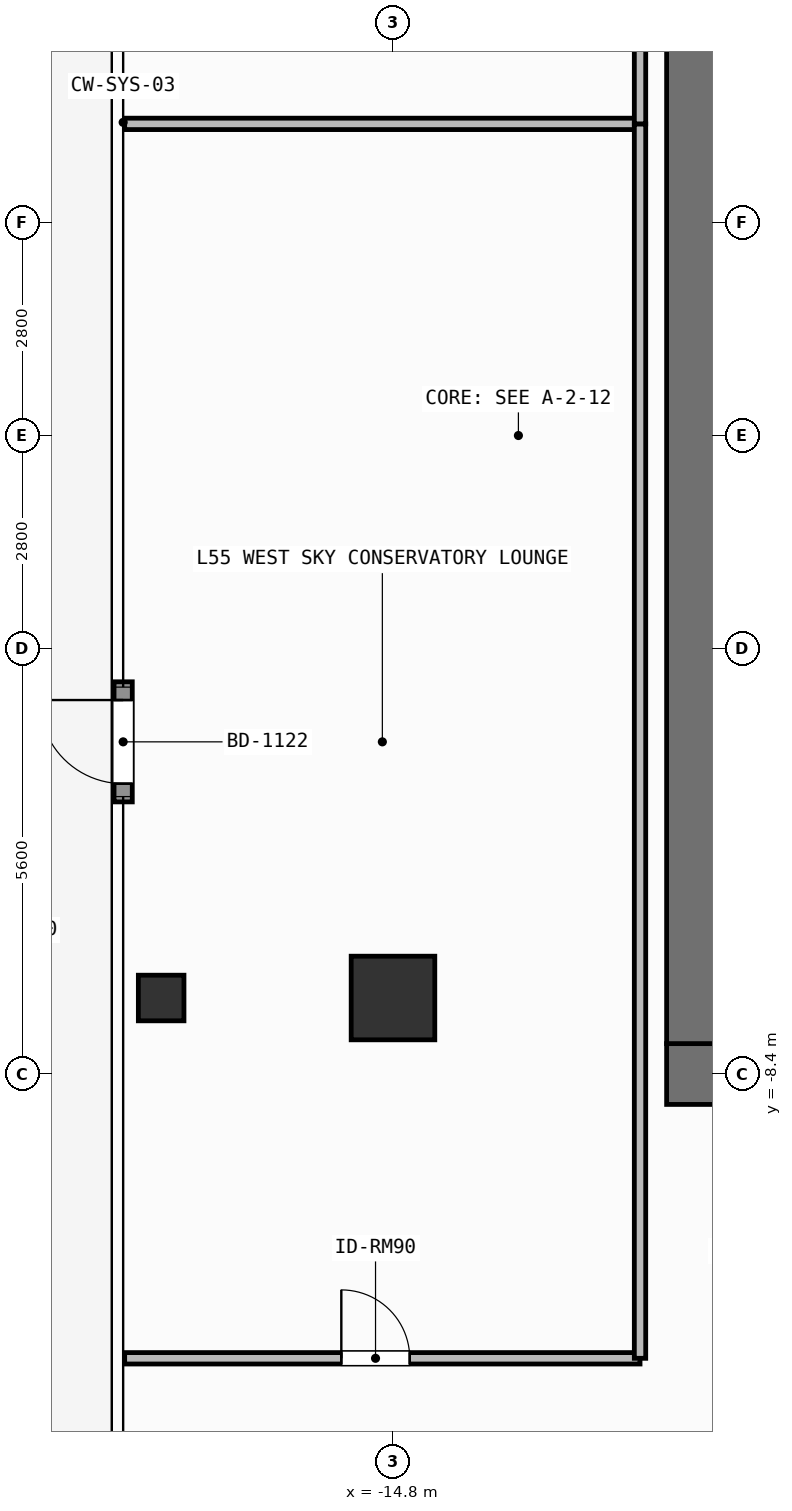
"""IFC4 building model, lengths in metres.
Left out: names, types, materials, properties, quantities, classifications, styles, units other than length and angle.
Written with IfcOpenShell. Run it as: python <this file> out.ifc"""

import sys

from ifc_helpers import new_model, si_unit, direction, frame, frame_2d, origin, origin_2d, place, context, subcontext, project, spatial, rectangle, hollow_rectangle, extrude, element, fill, save


model = new_model("IFC4")
c1 = context("Model", 3, precision=1e-05, world=origin(), true_north=direction((0.0, 1.0)))
c2 = subcontext(c1, "Body", "Model", "MODEL_VIEW")
j1 = project(units=[si_unit("LENGTHUNIT", "METRE"), si_unit("PLANEANGLEUNIT", "RADIAN")], contexts=[c1])
p1 = place(None, origin())
s1 = spatial("IfcSite", under=j1, at=p1, CompositionType="ELEMENT")
p2 = place(p1, origin())
s2 = spatial("IfcBuilding", under=s1, at=p2, CompositionType="ELEMENT")
p3 = place(p2, frame((0.0, 0.0, 223.5)))
s3 = spatial("IfcBuildingStorey", under=s2, at=p3, CompositionType="ELEMENT", Elevation=223.5)
p4 = place(p3, frame((-11.2, -8.4, 0.0), z_axis=(0.0, 0.0, 1.0), x_axis=(1.0, 0.0, 0.0)))
e1 = element("IfcWall", 1, at=p4, inside=s3, PredefinedType="SHEAR", context=c2, shape_type="SweptSolid", body=[
    extrude(rectangle(XDim=1.5, YDim=0.8, at=frame_2d((0.75, 0.0))), origin(), (0.0, 0.0, 1.0), 3.9),
])
p5 = place(p3, frame((-10.8, -8.0, 0.0), z_axis=(0.0, 0.0, 1.0), x_axis=(0.0, 1.0, 0.0)))
e2 = element("IfcWall", 2, at=p5, inside=s3, PredefinedType="SHEAR", context=c2, shape_type="SweptSolid", body=[
    extrude(rectangle(XDim=16.0, YDim=0.8, at=frame_2d((8.0, 0.0))), origin(), (0.0, 0.0, 1.0), 3.9),
])
p6 = place(p3, frame((-14.8, -7.4, 0.0), z_axis=(0.0, 0.0, 1.0), x_axis=(1.0, 0.0, 0.0)))
e3 = element("IfcColumn", 3, at=p6, inside=s3, PredefinedType="COLUMN", context=c2, shape_type="SweptSolid", body=[
    extrude(rectangle(XDim=1.1, YDim=1.1, at=origin_2d()), origin(), (0.0, 0.0, 1.0), 3.9),
])
p7 = place(p3, frame((-17.85, -7.4, 0.0), z_axis=(0.0, 0.0, 1.0), x_axis=(1.0, 0.0, 0.0)))
e4 = element("IfcColumn", 4, at=p7, inside=s3, PredefinedType="COLUMN", context=c2, shape_type="SweptSolid", body=[
    extrude(hollow_rectangle(XDim=0.6, YDim=0.6, WallThickness=0.028, at=origin_2d()), origin(), (0.0, 0.0, 1.0), 3.9),
])
p8 = place(p3, frame((-18.35, -4.82, 0.0), z_axis=(0.0, 0.0, 1.0), x_axis=(0.0, 1.0, 0.0)))
e5 = element("IfcWall", 5, at=p8, inside=s3, PredefinedType="SOLIDWALL", context=c2, shape_type="SweptSolid", body=[
    extrude(rectangle(XDim=1.58, YDim=0.24, at=frame_2d((0.79, 0.0))), origin(), (0.0, 0.0, 1.0), 3.68),
])
p9 = place(p8, frame((0.24, 0.0, 0.0)))
e6 = element("IfcOpeningElement", 6, at=p9, cuts=e5, PredefinedType="OPENING", context=c2, shape_type="SweptSolid", body=[
    extrude(rectangle(XDim=1.1, YDim=2.2, at=frame_2d((0.55, 1.1))), frame((0.0, 0.13, 0.0), z_axis=(0.0, -1.0, 0.0), x_axis=(1.0, 0.0, 0.0)), (0.0, 0.0, 1.0), 0.26),
])
p10 = place(p3, frame((-18.33, -12.14, 0.0), z_axis=(0.0, 0.0, 1.0), x_axis=(1.0, 0.0, 0.0)))
e7 = element("IfcWall", 7, at=p10, inside=s3, PredefinedType="PARTITIONING", context=c2, shape_type="SweptSolid", body=[
    extrude(rectangle(XDim=6.78, YDim=0.15, at=frame_2d((3.39, 0.0))), origin(), (0.0, 0.0, 1.0), 3.68),
])
p11 = place(p10, frame((2.85, 0.0, 0.0)))
e8 = element("IfcOpeningElement", 8, at=p11, cuts=e7, PredefinedType="OPENING", context=c2, shape_type="SweptSolid", body=[
    extrude(rectangle(XDim=0.9, YDim=2.1, at=frame_2d((0.45, 1.05))), frame((0.0, 0.085, 0.0), z_axis=(0.0, -1.0, 0.0), x_axis=(1.0, 0.0, 0.0)), (0.0, 0.0, 1.0), 0.17),
])
p12 = place(p3, frame((-18.33, 4.1, 0.0), z_axis=(0.0, 0.0, 1.0), x_axis=(1.0, 0.0, 0.0)))
e9 = element("IfcWall", 9, at=p12, inside=s3, PredefinedType="PARTITIONING", context=c2, shape_type="SweptSolid", body=[
    extrude(rectangle(XDim=6.78, YDim=0.15, at=frame_2d((3.39, 0.0))), origin(), (0.0, 0.0, 1.0), 3.68),
])
p13 = place(p3, frame((-11.55, -12.14, 0.0), z_axis=(0.0, 0.0, 1.0), x_axis=(0.0, 1.0, 0.0)))
e10 = element("IfcWall", 10, at=p13, inside=s3, PredefinedType="PARTITIONING", context=c2, shape_type="SweptSolid", body=[
    extrude(rectangle(XDim=16.24, YDim=0.15, at=frame_2d((8.12, 0.0))), origin(), (0.0, 0.0, 1.0), 3.68),
])
p14 = place(p3, frame((-11.55, 4.1, 0.0), z_axis=(0.0, 0.0, 1.0), x_axis=(0.0, 1.0, 0.0)))
e11 = element("IfcWall", 11, at=p14, inside=s3, PredefinedType="PARTITIONING", context=c2, shape_type="SweptSolid", body=[
    extrude(rectangle(XDim=8.04, YDim=0.15, at=frame_2d((4.02, 0.0))), origin(), (0.0, 0.0, 1.0), 3.68),
])
p15 = place(p9, origin())
e12 = element("IfcDoor", 12, at=p15, inside=s3, OperationType="SINGLE_SWING_RIGHT", PredefinedType="DOOR", context=c2, shape_type="SweptSolid", body=[
    extrude(rectangle(XDim=1.1, YDim=2.2, at=frame_2d((0.55, 1.1))), frame((0.0, 0.025, 0.0), z_axis=(0.0, -1.0, 0.0), x_axis=(1.0, 0.0, 0.0)), (0.0, 0.0, 1.0), 0.05),
])
fill(e6, e12)
p16 = place(p11, origin())
e13 = element("IfcDoor", 13, at=p16, inside=s3, OperationType="SINGLE_SWING_LEFT", PredefinedType="DOOR", context=c2, shape_type="SweptSolid", body=[
    extrude(rectangle(XDim=0.9, YDim=2.1, at=frame_2d((0.45, 1.05))), frame((0.0, 0.025, 0.0), z_axis=(0.0, -1.0, 0.0), x_axis=(1.0, 0.0, 0.0)), (0.0, 0.0, 1.0), 0.05),
])
fill(e8, e13)
save(model, sys.argv[1])
